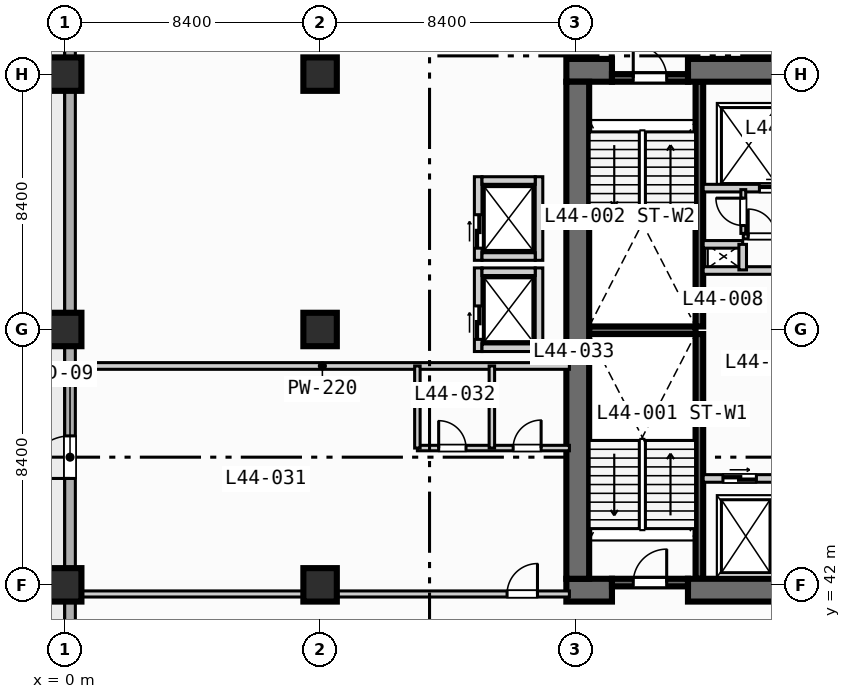
"""IFC4 building model, lengths in metres.
Left out: names, types, materials, properties, quantities, classifications, styles, units other than length and angle.
Written with IfcOpenShell. Run it as: python <this file> out.ifc"""

import sys

from ifc_helpers import new_model, si_unit, direction, frame, frame_2d, origin, origin_2d, place, context, subcontext, project, spatial, rectangle, extrude, element, fill, save


model = new_model("IFC4")
c1 = context("Model", 3, precision=1e-05, world=origin(), true_north=direction((0.0, 1.0)))
c2 = subcontext(c1, "Body", "Model", "MODEL_VIEW")
j1 = project(units=[si_unit("LENGTHUNIT", "METRE"), si_unit("PLANEANGLEUNIT", "RADIAN")], contexts=[c1])
p1 = place(None, origin())
s1 = spatial("IfcSite", under=j1, at=p1, CompositionType="ELEMENT")
p2 = place(p1, origin())
s2 = spatial("IfcBuilding", under=s1, at=p2, CompositionType="ELEMENT")
p3 = place(p2, frame((0.0, 0.0, 182.8)))
s3 = spatial("IfcBuildingStorey", under=s2, at=p3, CompositionType="ELEMENT", Elevation=182.8)
for number, where, z_axis, x_axis in (
    (1, (20.875, 42.2, 0.0), (0.0, 0.0, 1.0), (0.0, 1.0, 0.0)),
    (2, (20.875, 50.5, 0.0), (0.0, 0.0, 1.0), (0.0, 1.0, 0.0)),
):
    element("IfcWall", number, at=place(p3, frame(where, z_axis=z_axis, x_axis=x_axis)), inside=s3, PredefinedType="SOLIDWALL", context=c2, shape_type="SweptSolid", body=[
        extrude(rectangle(XDim=8.05, YDim=0.25, at=frame_2d((4.025, 0.0))), origin(), (0.0, 0.0, 1.0), 3.47),
    ])
p4 = place(p3, frame((17.25, 50.375, 0.0), z_axis=(0.0, 0.0, 1.0), x_axis=(1.0, 0.0, 0.0)))
e3 = element("IfcWall", 3, at=p4, inside=s3, PredefinedType="SOLIDWALL", context=c2, shape_type="SweptSolid", body=[
    extrude(rectangle(XDim=3.5, YDim=0.25, at=frame_2d((1.75, 0.0))), origin(), (0.0, 0.0, 1.0), 3.47),
])
p5 = place(p3, frame((16.5, 41.825, 0.0), z_axis=(0.0, 0.0, 1.0), x_axis=(1.0, 0.0, 0.0)))
e4 = element("IfcWall", 4, at=p5, inside=s3, PredefinedType="SHEAR", context=c2, shape_type="SweptSolid", body=[
    extrude(rectangle(XDim=1.5, YDim=0.75, at=frame_2d((0.75, 0.0))), origin(), (0.0, 0.0, 1.0), 3.47),
])
p6 = place(p3, frame((20.5, 41.825, 0.0), z_axis=(0.0, 0.0, 1.0), x_axis=(1.0, 0.0, 0.0)))
e5 = element("IfcWall", 5, at=p6, inside=s3, PredefinedType="SHEAR", context=c2, shape_type="SweptSolid", body=[
    extrude(rectangle(XDim=5.075, YDim=0.75, at=frame_2d((2.538, 0.0))), origin(), (0.0, 0.0, 1.0), 3.47),
])
p7 = place(p3, frame((16.5, 58.925, 0.0), z_axis=(0.0, 0.0, 1.0), x_axis=(1.0, 0.0, 0.0)))
e6 = element("IfcWall", 6, at=p7, inside=s3, PredefinedType="SHEAR", context=c2, shape_type="SweptSolid", body=[
    extrude(rectangle(XDim=1.5, YDim=0.75, at=frame_2d((0.75, 0.0))), origin(), (0.0, 0.0, 1.0), 3.47),
])
p8 = place(p3, frame((20.5, 58.925, 0.0), z_axis=(0.0, 0.0, 1.0), x_axis=(1.0, 0.0, 0.0)))
e7 = element("IfcWall", 7, at=p8, inside=s3, PredefinedType="SHEAR", context=c2, shape_type="SweptSolid", body=[
    extrude(rectangle(XDim=5.075, YDim=0.75, at=frame_2d((2.538, 0.0))), origin(), (0.0, 0.0, 1.0), 3.47),
])
p9 = place(p3, frame((16.875, 42.2, 0.0), z_axis=(0.0, 0.0, 1.0), x_axis=(0.0, 1.0, 0.0)))
e8 = element("IfcWall", 8, at=p9, inside=s3, PredefinedType="SHEAR", context=c2, shape_type="SweptSolid", body=[
    extrude(rectangle(XDim=16.35, YDim=0.75, at=frame_2d((8.175, 0.0))), origin(), (0.0, 0.0, 1.0), 3.47),
])
for number, where, z_axis, x_axis in (
    (9, (0.0, 42.0, 0.0), (0.0, 0.0, 1.0), (1.0, 0.0, 0.0)),
    (10, (0.0, 50.4, 0.0), (0.0, 0.0, 1.0), (1.0, 0.0, 0.0)),
    (11, (0.0, 58.8, 0.0), (0.0, 0.0, 1.0), (1.0, 0.0, 0.0)),
    (12, (8.4, 42.0, 0.0), (0.0, 0.0, 1.0), (1.0, 0.0, 0.0)),
    (13, (8.4, 50.4, 0.0), (0.0, 0.0, 1.0), (1.0, 0.0, 0.0)),
    (14, (8.4, 58.8, 0.0), (0.0, 0.0, 1.0), (1.0, 0.0, 0.0)),
):
    element("IfcColumn", number, at=place(p3, frame(where, z_axis=z_axis, x_axis=x_axis)), inside=s3, PredefinedType="COLUMN", context=c2, shape_type="SweptSolid", body=[
        extrude(rectangle(XDim=1.1, YDim=1.1, at=origin_2d()), origin(), (0.0, 0.0, 1.0), 3.7),
    ])
p10 = place(p3, frame((0.175, 3.175, 0.0), z_axis=(0.0, 0.0, 1.0), x_axis=(0.0, 1.0, 0.0)))
e15 = element("IfcWall", 15, at=p10, inside=s3, PredefinedType="STANDARD", context=c2, shape_type="SweptSolid", body=[
    extrude(rectangle(XDim=69.25, YDim=0.35, at=frame_2d((34.625, 0.0))), origin(), (0.0, 0.0, 1.0), 3.47),
])
p11 = place(p10, frame((42.325, 0.0, 0.0)))
e16 = element("IfcOpeningElement", 16, at=p11, cuts=e15, PredefinedType="OPENING", context=c2, shape_type="SweptSolid", body=[
    extrude(rectangle(XDim=1.4, YDim=2.2, at=frame_2d((0.7, 1.1))), frame((0.0, 0.185, 0.0), z_axis=(0.0, -1.0, 0.0), x_axis=(1.0, 0.0, 0.0)), (0.0, 0.0, 1.0), 0.37),
])
p12 = place(p10, frame((33.725, 0.0, 0.85)))
e17 = element("IfcOpeningElement", 17, at=p12, cuts=e15, PredefinedType="OPENING", context=c2, shape_type="SweptSolid", body=[
    extrude(rectangle(XDim=1.8, YDim=1.8, at=frame_2d((0.9, 0.9))), frame((0.0, 0.185, 0.0), z_axis=(0.0, -1.0, 0.0), x_axis=(1.0, 0.0, 0.0)), (0.0, 0.0, 1.0), 0.37),
])
p13 = place(p10, frame((18.8, 0.0, 0.85)))
e18 = element("IfcOpeningElement", 18, at=p13, cuts=e15, PredefinedType="OPENING", context=c2, shape_type="SweptSolid", body=[
    extrude(rectangle(XDim=1.8, YDim=1.8, at=frame_2d((0.9, 0.9))), frame((0.0, 0.185, 0.0), z_axis=(0.0, -1.0, 0.0), x_axis=(1.0, 0.0, 0.0)), (0.0, 0.0, 1.0), 0.37),
])
p14 = place(p10, frame((23.15, 0.0, 0.85)))
e19 = element("IfcOpeningElement", 19, at=p14, cuts=e15, PredefinedType="OPENING", context=c2, shape_type="SweptSolid", body=[
    extrude(rectangle(XDim=1.8, YDim=1.8, at=frame_2d((0.9, 0.9))), frame((0.0, 0.185, 0.0), z_axis=(0.0, -1.0, 0.0), x_axis=(1.0, 0.0, 0.0)), (0.0, 0.0, 1.0), 0.37),
])
p15 = place(p10, frame((27.5, 0.0, 0.85)))
e20 = element("IfcOpeningElement", 20, at=p15, cuts=e15, PredefinedType="OPENING", context=c2, shape_type="SweptSolid", body=[
    extrude(rectangle(XDim=1.8, YDim=1.8, at=frame_2d((0.9, 0.9))), frame((0.0, 0.185, 0.0), z_axis=(0.0, -1.0, 0.0), x_axis=(1.0, 0.0, 0.0)), (0.0, 0.0, 1.0), 0.37),
])
p16 = place(p3, frame((18.0, 42.075, 0.0), z_axis=(0.0, 0.0, 1.0), x_axis=(1.0, 0.0, 0.0)))
e21 = element("IfcWall", 21, at=p16, inside=s3, PredefinedType="SOLIDWALL", context=c2, shape_type="SweptSolid", body=[
    extrude(rectangle(XDim=2.5, YDim=0.25, at=frame_2d((1.25, 0.0))), origin(), (0.0, 0.0, 1.0), 3.47),
])
p17 = place(p16, frame((0.7, 0.0, 0.0)))
e22 = element("IfcOpeningElement", 22, at=p17, cuts=e21, PredefinedType="OPENING", context=c2, shape_type="SweptSolid", body=[
    extrude(rectangle(XDim=1.1, YDim=2.15, at=frame_2d((0.55, 1.075))), frame((0.0, 0.135, 0.0), z_axis=(0.0, -1.0, 0.0), x_axis=(1.0, 0.0, 0.0)), (0.0, 0.0, 1.0), 0.27),
])
p18 = place(p3, frame((18.0, 58.675, 0.0), z_axis=(0.0, 0.0, 1.0), x_axis=(1.0, 0.0, 0.0)))
e23 = element("IfcWall", 23, at=p18, inside=s3, PredefinedType="SOLIDWALL", context=c2, shape_type="SweptSolid", body=[
    extrude(rectangle(XDim=2.5, YDim=0.25, at=frame_2d((1.25, 0.0))), origin(), (0.0, 0.0, 1.0), 3.47),
])
p19 = place(p18, frame((0.7, 0.0, 0.0)))
e24 = element("IfcOpeningElement", 24, at=p19, cuts=e23, PredefinedType="OPENING", context=c2, shape_type="SweptSolid", body=[
    extrude(rectangle(XDim=1.1, YDim=2.15, at=frame_2d((0.55, 1.075))), frame((0.0, 0.135, 0.0), z_axis=(0.0, -1.0, 0.0), x_axis=(1.0, 0.0, 0.0)), (0.0, 0.0, 1.0), 0.27),
])
p20 = place(p3, frame((21.0, 45.5, 0.0), z_axis=(0.0, 0.0, 1.0), x_axis=(1.0, 0.0, 0.0)))
e25 = element("IfcWall", 25, at=p20, inside=s3, PredefinedType="SOLIDWALL", context=c2, shape_type="SweptSolid", body=[
    extrude(rectangle(XDim=4.15, YDim=0.25, at=frame_2d((2.075, 0.0))), origin(), (0.0, 0.0, 1.0), 3.47),
])
p21 = place(p20, frame((0.65, 0.0, 0.0)))
e26 = element("IfcOpeningElement", 26, at=p21, cuts=e25, PredefinedType="OPENING", context=c2, shape_type="SweptSolid", body=[
    extrude(rectangle(XDim=1.1, YDim=2.15, at=frame_2d((0.55, 1.075))), frame((0.0, 0.135, 0.0), z_axis=(0.0, -1.0, 0.0), x_axis=(1.0, 0.0, 0.0)), (0.0, 0.0, 1.0), 0.27),
])
p22 = place(p3, frame((21.0, 52.34, 0.0), z_axis=(0.0, 0.0, 1.0), x_axis=(1.0, 0.0, 0.0)))
e27 = element("IfcWall", 27, at=p22, inside=s3, PredefinedType="SOLIDWALL", context=c2, shape_type="SweptSolid", body=[
    extrude(rectangle(XDim=3.825, YDim=0.25, at=frame_2d((1.913, 0.0))), origin(), (0.0, 0.0, 1.0), 3.47),
])
p23 = place(p3, frame((21.0, 55.05, 0.0), z_axis=(0.0, 0.0, 1.0), x_axis=(1.0, 0.0, 0.0)))
e28 = element("IfcWall", 28, at=p23, inside=s3, PredefinedType="SOLIDWALL", context=c2, shape_type="SweptSolid", body=[
    extrude(rectangle(XDim=4.15, YDim=0.25, at=frame_2d((2.075, 0.0))), origin(), (0.0, 0.0, 1.0), 3.47),
])
p24 = place(p23, frame((1.85, 0.0, 0.0)))
e29 = element("IfcOpeningElement", 29, at=p24, cuts=e28, PredefinedType="OPENING", context=c2, shape_type="SweptSolid", body=[
    extrude(rectangle(XDim=1.1, YDim=2.15, at=frame_2d((0.55, 1.075))), frame((0.0, 0.135, 0.0), z_axis=(0.0, -1.0, 0.0), x_axis=(1.0, 0.0, 0.0)), (0.0, 0.0, 1.0), 0.27),
])
p25 = place(p3, frame((21.0, 53.2, 0.0), z_axis=(0.0, 0.0, 1.0), x_axis=(1.0, 0.0, 0.0)))
e30 = element("IfcWall", 30, at=p25, inside=s3, PredefinedType="SOLIDWALL", context=c2, shape_type="SweptSolid", body=[
    extrude(rectangle(XDim=1.3, YDim=0.25, at=frame_2d((0.65, 0.0))), origin(), (0.0, 0.0, 1.0), 3.47),
])
p26 = place(p3, frame((22.3, 52.36, 0.0), z_axis=(0.0, 0.0, 1.0), x_axis=(0.0, 1.0, 0.0)))
e31 = element("IfcWall", 31, at=p26, inside=s3, PredefinedType="SOLIDWALL", context=c2, shape_type="SweptSolid", body=[
    extrude(rectangle(XDim=0.84, YDim=0.25, at=frame_2d((0.42, 0.0))), origin(), (0.0, 0.0, 1.0), 3.47),
])
p27 = place(p3, frame((22.32, 53.56, 0.0), z_axis=(0.0, 0.0, 1.0), x_axis=(0.0, 1.0, 0.0)))
e32 = element("IfcWall", 32, at=p27, inside=s3, PredefinedType="PARTITIONING", context=c2, shape_type="SweptSolid", body=[
    extrude(rectangle(XDim=1.44, YDim=0.16, at=frame_2d((0.72, 0.0))), origin(), (0.0, 0.0, 1.0), 3.47),
])
p28 = place(p27, frame((0.26, 0.0, 0.0)))
e33 = element("IfcOpeningElement", 33, at=p28, cuts=e32, PredefinedType="OPENING", context=c2, shape_type="SweptSolid", body=[
    extrude(rectangle(XDim=0.9, YDim=2.1, at=frame_2d((0.45, 1.05))), frame((0.0, 0.09, 0.0), z_axis=(0.0, -1.0, 0.0), x_axis=(1.0, 0.0, 0.0)), (0.0, 0.0, 1.0), 0.18),
])
p29 = place(p3, frame((22.32, 53.46, 0.0), z_axis=(0.0, 0.0, 1.0), x_axis=(1.0, 0.0, 0.0)))
e34 = element("IfcWall", 34, at=p29, inside=s3, PredefinedType="PARTITIONING", context=c2, shape_type="SweptSolid", body=[
    extrude(rectangle(XDim=2.36, YDim=0.16, at=frame_2d((1.18, 0.0))), origin(), (0.0, 0.0, 1.0), 3.47),
])
p30 = place(p29, frame((0.16, 0.0, 0.0)))
e35 = element("IfcOpeningElement", 35, at=p30, cuts=e34, PredefinedType="OPENING", context=c2, shape_type="SweptSolid", body=[
    extrude(rectangle(XDim=0.9, YDim=2.1, at=frame_2d((0.45, 1.05))), frame((0.0, 0.09, 0.0), z_axis=(0.0, -1.0, 0.0), x_axis=(1.0, 0.0, 0.0)), (0.0, 0.0, 1.0), 0.18),
])
p31 = place(p3, frame((13.6, 49.675, 0.0), z_axis=(0.0, 0.0, 1.0), x_axis=(0.0, 1.0, 0.0)))
e36 = element("IfcWall", 36, at=p31, inside=s3, PredefinedType="SOLIDWALL", context=c2, shape_type="SweptSolid", body=[
    extrude(rectangle(XDim=2.75, YDim=0.25, at=frame_2d((1.375, 0.0))), origin(), (0.0, 0.0, 1.0), 3.47),
])
p32 = place(p31, frame((0.4, 0.0, 0.0)))
e37 = element("IfcOpeningElement", 37, at=p32, cuts=e36, PredefinedType="OPENING", context=c2, shape_type="SweptSolid", body=[
    extrude(rectangle(XDim=1.1, YDim=2.15, at=frame_2d((0.55, 1.075))), frame((0.0, 0.135, 0.0), z_axis=(0.0, -1.0, 0.0), x_axis=(1.0, 0.0, 0.0)), (0.0, 0.0, 1.0), 0.27),
])
p33 = place(p3, frame((15.6, 49.675, 0.0), z_axis=(0.0, 0.0, 1.0), x_axis=(0.0, 1.0, 0.0)))
e38 = element("IfcWall", 38, at=p33, inside=s3, PredefinedType="SOLIDWALL", context=c2, shape_type="SweptSolid", body=[
    extrude(rectangle(XDim=2.75, YDim=0.25, at=frame_2d((1.375, 0.0))), origin(), (0.0, 0.0, 1.0), 3.47),
])
for number, where, z_axis, x_axis in (
    (39, (13.725, 49.8, 0.0), (0.0, 0.0, 1.0), (1.0, 0.0, 0.0)),
    (40, (13.725, 52.3, 0.0), (0.0, 0.0, 1.0), (1.0, 0.0, 0.0)),
):
    element("IfcWall", number, at=place(p3, frame(where, z_axis=z_axis, x_axis=x_axis)), inside=s3, PredefinedType="SOLIDWALL", context=c2, shape_type="SweptSolid", body=[
        extrude(rectangle(XDim=1.75, YDim=0.25, at=frame_2d((0.875, 0.0))), origin(), (0.0, 0.0, 1.0), 3.47),
    ])
p34 = place(p3, frame((13.6, 52.675, 0.0), z_axis=(0.0, 0.0, 1.0), x_axis=(0.0, 1.0, 0.0)))
e41 = element("IfcWall", 41, at=p34, inside=s3, PredefinedType="SOLIDWALL", context=c2, shape_type="SweptSolid", body=[
    extrude(rectangle(XDim=2.75, YDim=0.25, at=frame_2d((1.375, 0.0))), origin(), (0.0, 0.0, 1.0), 3.47),
])
p35 = place(p34, frame((0.4, 0.0, 0.0)))
e42 = element("IfcOpeningElement", 42, at=p35, cuts=e41, PredefinedType="OPENING", context=c2, shape_type="SweptSolid", body=[
    extrude(rectangle(XDim=1.1, YDim=2.15, at=frame_2d((0.55, 1.075))), frame((0.0, 0.135, 0.0), z_axis=(0.0, -1.0, 0.0), x_axis=(1.0, 0.0, 0.0)), (0.0, 0.0, 1.0), 0.27),
])
p36 = place(p3, frame((15.6, 52.675, 0.0), z_axis=(0.0, 0.0, 1.0), x_axis=(0.0, 1.0, 0.0)))
e43 = element("IfcWall", 43, at=p36, inside=s3, PredefinedType="SOLIDWALL", context=c2, shape_type="SweptSolid", body=[
    extrude(rectangle(XDim=2.75, YDim=0.25, at=frame_2d((1.375, 0.0))), origin(), (0.0, 0.0, 1.0), 3.47),
])
for number, where, z_axis, x_axis in (
    (44, (13.725, 52.8, 0.0), (0.0, 0.0, 1.0), (1.0, 0.0, 0.0)),
    (45, (13.725, 55.3, 0.0), (0.0, 0.0, 1.0), (1.0, 0.0, 0.0)),
):
    element("IfcWall", number, at=place(p3, frame(where, z_axis=z_axis, x_axis=x_axis)), inside=s3, PredefinedType="SOLIDWALL", context=c2, shape_type="SweptSolid", body=[
        extrude(rectangle(XDim=1.75, YDim=0.25, at=frame_2d((0.875, 0.0))), origin(), (0.0, 0.0, 1.0), 3.47),
    ])
p37 = place(p3, frame((0.35, 41.7, 0.0), z_axis=(0.0, 0.0, 1.0), x_axis=(1.0, 0.0, 0.0)))
e46 = element("IfcWall", 46, at=p37, inside=s3, PredefinedType="PARTITIONING", context=c2, shape_type="SweptSolid", body=[
    extrude(rectangle(XDim=16.25, YDim=0.2, at=frame_2d((8.125, 0.0))), origin(), (0.0, 0.0, 1.0), 2.82),
])
p38 = place(p37, frame((14.2, 0.0, 0.0)))
e47 = element("IfcOpeningElement", 47, at=p38, cuts=e46, PredefinedType="OPENING", context=c2, shape_type="SweptSolid", body=[
    extrude(rectangle(XDim=1.0, YDim=2.15, at=frame_2d((0.5, 1.075))), frame((0.0, 0.11, 0.0), z_axis=(0.0, -1.0, 0.0), x_axis=(1.0, 0.0, 0.0)), (0.0, 0.0, 1.0), 0.22),
])
p39 = place(p3, frame((0.35, 49.2, 0.0), z_axis=(0.0, 0.0, 1.0), x_axis=(1.0, 0.0, 0.0)))
e48 = element("IfcWall", 48, at=p39, inside=s3, PredefinedType="PARTITIONING", context=c2, shape_type="SweptSolid", body=[
    extrude(rectangle(XDim=16.25, YDim=0.22, at=frame_2d((8.125, 0.0))), origin(), (0.0, 0.0, 1.0), 3.47),
])
p40 = place(p3, frame((11.6, 46.5, 0.0), z_axis=(0.0, 0.0, 1.0), x_axis=(1.0, 0.0, 0.0)))
e49 = element("IfcWall", 49, at=p40, inside=s3, PredefinedType="PLUMBINGWALL", context=c2, shape_type="SweptSolid", body=[
    extrude(rectangle(XDim=5.0, YDim=0.18, at=frame_2d((2.5, 0.0))), origin(), (0.0, 0.0, 1.0), 3.47),
])
p41 = place(p40, frame((0.7, 0.0, 0.0)))
e50 = element("IfcOpeningElement", 50, at=p41, cuts=e49, PredefinedType="OPENING", context=c2, shape_type="SweptSolid", body=[
    extrude(rectangle(XDim=0.9, YDim=2.1, at=frame_2d((0.45, 1.05))), frame((0.0, 0.1, 0.0), z_axis=(0.0, -1.0, 0.0), x_axis=(1.0, 0.0, 0.0)), (0.0, 0.0, 1.0), 0.2),
])
p42 = place(p40, frame((3.15, 0.0, 0.0)))
e51 = element("IfcOpeningElement", 51, at=p42, cuts=e49, PredefinedType="OPENING", context=c2, shape_type="SweptSolid", body=[
    extrude(rectangle(XDim=0.92, YDim=2.1, at=frame_2d((0.46, 1.05))), frame((0.0, 0.1, 0.0), z_axis=(0.0, -1.0, 0.0), x_axis=(1.0, 0.0, 0.0)), (0.0, 0.0, 1.0), 0.2),
])
for number, where, z_axis, x_axis in (
    (52, (11.6, 46.5, 0.0), (0.0, 0.0, 1.0), (0.0, 1.0, 0.0)),
    (53, (14.05, 46.5, 0.0), (0.0, 0.0, 1.0), (0.0, 1.0, 0.0)),
):
    element("IfcWall", number, at=place(p3, frame(where, z_axis=z_axis, x_axis=x_axis)), inside=s3, PredefinedType="PLUMBINGWALL", context=c2, shape_type="SweptSolid", body=[
        extrude(rectangle(XDim=2.7, YDim=0.18, at=frame_2d((1.35, 0.0))), origin(), (0.0, 0.0, 1.0), 3.47),
    ])
p43 = place(p11, origin())
e54 = element("IfcDoor", 54, at=p43, inside=s3, OperationType="SINGLE_SWING_LEFT", PredefinedType="DOOR", context=c2, shape_type="SweptSolid", body=[
    extrude(rectangle(XDim=1.4, YDim=2.2, at=frame_2d((0.7, 1.1))), frame((0.0, 0.025, 0.0), z_axis=(0.0, -1.0, 0.0), x_axis=(1.0, 0.0, 0.0)), (0.0, 0.0, 1.0), 0.05),
])
fill(e16, e54)
p44 = place(p17, origin())
e55 = element("IfcDoor", 55, at=p44, inside=s3, OperationType="SINGLE_SWING_RIGHT", PredefinedType="DOOR", context=c2, shape_type="SweptSolid", body=[
    extrude(rectangle(XDim=1.1, YDim=2.15, at=frame_2d((0.55, 1.075))), frame((0.0, 0.025, 0.0), z_axis=(0.0, -1.0, 0.0), x_axis=(1.0, 0.0, 0.0)), (0.0, 0.0, 1.0), 0.05),
])
fill(e22, e55)
p45 = place(p19, origin())
e56 = element("IfcDoor", 56, at=p45, inside=s3, OperationType="SINGLE_SWING_LEFT", PredefinedType="DOOR", context=c2, shape_type="SweptSolid", body=[
    extrude(rectangle(XDim=1.1, YDim=2.15, at=frame_2d((0.55, 1.075))), frame((0.0, 0.025, 0.0), z_axis=(0.0, -1.0, 0.0), x_axis=(1.0, 0.0, 0.0)), (0.0, 0.0, 1.0), 0.05),
])
fill(e24, e56)
p46 = place(p21, origin())
e57 = element("IfcDoor", 57, at=p46, inside=s3, OperationType="SLIDING_TO_LEFT", PredefinedType="DOOR", context=c2, shape_type="SweptSolid", body=[
    extrude(rectangle(XDim=1.1, YDim=2.15, at=frame_2d((0.55, 1.075))), frame((0.0, 0.025, 0.0), z_axis=(0.0, -1.0, 0.0), x_axis=(1.0, 0.0, 0.0)), (0.0, 0.0, 1.0), 0.05),
])
fill(e26, e57)
p47 = place(p24, origin())
e58 = element("IfcDoor", 58, at=p47, inside=s3, OperationType="SLIDING_TO_LEFT", PredefinedType="DOOR", context=c2, shape_type="SweptSolid", body=[
    extrude(rectangle(XDim=1.1, YDim=2.15, at=frame_2d((0.55, 1.075))), frame((0.0, 0.025, 0.0), z_axis=(0.0, -1.0, 0.0), x_axis=(1.0, 0.0, 0.0)), (0.0, 0.0, 1.0), 0.05),
])
fill(e29, e58)
p48 = place(p28, origin())
e59 = element("IfcDoor", 59, at=p48, inside=s3, OperationType="SINGLE_SWING_RIGHT", PredefinedType="DOOR", context=c2, shape_type="SweptSolid", body=[
    extrude(rectangle(XDim=0.9, YDim=2.1, at=frame_2d((0.45, 1.05))), frame((0.0, 0.025, 0.0), z_axis=(0.0, -1.0, 0.0), x_axis=(1.0, 0.0, 0.0)), (0.0, 0.0, 1.0), 0.05),
])
fill(e33, e59)
p49 = place(p30, origin())
e60 = element("IfcDoor", 60, at=p49, inside=s3, OperationType="SINGLE_SWING_LEFT", PredefinedType="DOOR", context=c2, shape_type="SweptSolid", body=[
    extrude(rectangle(XDim=0.9, YDim=2.1, at=frame_2d((0.45, 1.05))), frame((0.0, 0.025, 0.0), z_axis=(0.0, -1.0, 0.0), x_axis=(1.0, 0.0, 0.0)), (0.0, 0.0, 1.0), 0.05),
])
fill(e35, e60)
p50 = place(p32, origin())
e61 = element("IfcDoor", 61, at=p50, inside=s3, OperationType="SLIDING_TO_LEFT", PredefinedType="DOOR", context=c2, shape_type="SweptSolid", body=[
    extrude(rectangle(XDim=1.1, YDim=2.15, at=frame_2d((0.55, 1.075))), frame((0.0, 0.025, 0.0), z_axis=(0.0, -1.0, 0.0), x_axis=(1.0, 0.0, 0.0)), (0.0, 0.0, 1.0), 0.05),
])
fill(e37, e61)
p51 = place(p35, origin())
e62 = element("IfcDoor", 62, at=p51, inside=s3, OperationType="SLIDING_TO_LEFT", PredefinedType="DOOR", context=c2, shape_type="SweptSolid", body=[
    extrude(rectangle(XDim=1.1, YDim=2.15, at=frame_2d((0.55, 1.075))), frame((0.0, 0.025, 0.0), z_axis=(0.0, -1.0, 0.0), x_axis=(1.0, 0.0, 0.0)), (0.0, 0.0, 1.0), 0.05),
])
fill(e42, e62)
p52 = place(p38, origin())
e63 = element("IfcDoor", 63, at=p52, inside=s3, OperationType="SINGLE_SWING_RIGHT", PredefinedType="DOOR", context=c2, shape_type="SweptSolid", body=[
    extrude(rectangle(XDim=1.0, YDim=2.15, at=frame_2d((0.5, 1.075))), frame((0.0, 0.025, 0.0), z_axis=(0.0, -1.0, 0.0), x_axis=(1.0, 0.0, 0.0)), (0.0, 0.0, 1.0), 0.05),
])
fill(e47, e63)
p53 = place(p41, origin())
e64 = element("IfcDoor", 64, at=p53, inside=s3, OperationType="SINGLE_SWING_LEFT", PredefinedType="DOOR", context=c2, shape_type="SweptSolid", body=[
    extrude(rectangle(XDim=0.9, YDim=2.1, at=frame_2d((0.45, 1.05))), frame((0.0, 0.025, 0.0), z_axis=(0.0, -1.0, 0.0), x_axis=(1.0, 0.0, 0.0)), (0.0, 0.0, 1.0), 0.05),
])
fill(e50, e64)
p54 = place(p42, origin())
e65 = element("IfcDoor", 65, at=p54, inside=s3, OperationType="SINGLE_SWING_RIGHT", PredefinedType="DOOR", context=c2, shape_type="SweptSolid", body=[
    extrude(rectangle(XDim=0.92, YDim=2.1, at=frame_2d((0.46, 1.05))), frame((0.0, 0.025, 0.0), z_axis=(0.0, -1.0, 0.0), x_axis=(1.0, 0.0, 0.0)), (0.0, 0.0, 1.0), 0.05),
])
fill(e51, e65)
save(model, sys.argv[1])
